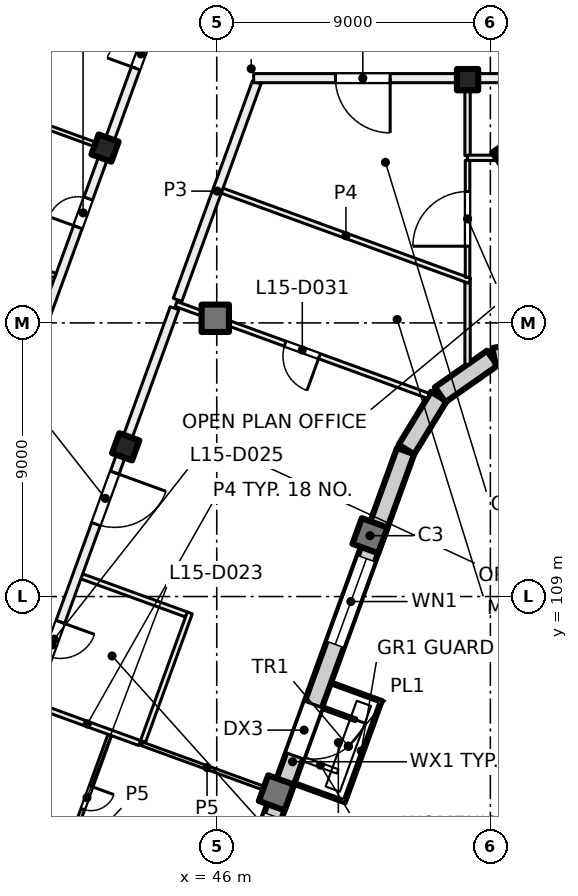
"""IFC4 building model, lengths in metres.
Left out: names, types, materials, properties, quantities, classifications, styles, units other than length and angle.
Written with IfcOpenShell. Run it as: python <this file> out.ifc"""

import sys

from ifc_helpers import new_model, si_unit, direction, frame, frame_2d, origin, origin_2d, place, context, subcontext, project, spatial, rectangle, hollow_rectangle, extrude, element, fill, save


model = new_model("IFC4")
c1 = context("Model", 3, precision=1e-05, world=origin(), true_north=direction((0.0, 1.0)))
c2 = subcontext(c1, "Body", "Model", "MODEL_VIEW")
j1 = project(units=[si_unit("LENGTHUNIT", "METRE"), si_unit("PLANEANGLEUNIT", "RADIAN")], contexts=[c1])
p1 = place(None, origin())
s1 = spatial("IfcSite", under=j1, at=p1, CompositionType="ELEMENT")
p2 = place(p1, origin())
s2 = spatial("IfcBuilding", under=s1, at=p2, CompositionType="ELEMENT")
p3 = place(p2, frame((0.0, 0.0, 67.5)))
s3 = spatial("IfcBuildingStorey", under=s2, at=p3, CompositionType="ELEMENT", Elevation=67.5)
p4 = place(p3, frame((56.036, 123.43, 0.0), z_axis=(0.0, 0.0, 1.0), x_axis=(0.573576436351, -0.819152044289, 0.0)))
e1 = element("IfcColumn", 1, at=p4, inside=s3, PredefinedType="COLUMN", context=c2, shape_type="SweptSolid", body=[
    extrude(hollow_rectangle(XDim=1.4, YDim=1.4, WallThickness=0.04, at=origin_2d()), origin(), (0.0, 0.0, 1.0), 4.0),
])
p5 = place(p3, frame((54.25, 126.0, 0.0), z_axis=(0.0, 0.0, 1.0), x_axis=(1.0, 0.0, 0.0)))
e2 = element("IfcColumn", 2, at=p5, inside=s3, PredefinedType="COLUMN", context=c2, shape_type="SweptSolid", body=[
    extrude(rectangle(XDim=0.7, YDim=0.7, at=origin_2d()), origin(), (0.0, 0.0, 1.0), 4.0),
])
p6 = place(p3, frame((45.952, 118.152, 0.0), z_axis=(0.0, 0.0, 1.0), x_axis=(1.0, 0.0, 0.0)))
e3 = element("IfcColumn", 3, at=p6, inside=s3, PredefinedType="COLUMN", context=c2, shape_type="SweptSolid", body=[
    extrude(rectangle(XDim=0.9, YDim=0.9, at=origin_2d()), origin(), (0.0, 0.0, 1.0), 4.0),
])
for number, where, z_axis, x_axis in (
    (4, (43.006, 113.925, 0.0), (0.0, 0.0, 1.0), (-0.342, -0.94, 0.0)),
    (5, (42.325, 123.751, 0.0), (0.0, 0.0, 1.0), (-0.342, -0.94, 0.0)),
):
    element("IfcColumn", number, at=place(p3, frame(where, z_axis=z_axis, x_axis=x_axis)), inside=s3, PredefinedType="COLUMN", context=c2, shape_type="SweptSolid", body=[
        extrude(rectangle(XDim=0.7, YDim=0.7, at=origin_2d()), origin(), (0.0, 0.0, 1.0), 4.0),
    ])
for number, where, z_axis, x_axis in (
    (6, (51.04, 111.001, 0.0), (0.0, 0.0, 1.0), (-0.342, -0.94, 0.0)),
    (7, (47.962, 102.544, 0.0), (0.0, 0.0, 1.0), (-0.342, -0.94, 0.0)),
):
    element("IfcColumn", number, at=place(p3, frame(where, z_axis=z_axis, x_axis=x_axis)), inside=s3, PredefinedType="COLUMN", context=c2, shape_type="SweptSolid", body=[
        extrude(rectangle(XDim=0.9, YDim=0.9, at=origin_2d()), origin(), (0.0, 0.0, 1.0), 4.0),
    ])
p7 = place(p3, frame((52.212, 113.783, 0.0), z_axis=(0.0, 0.0, 1.0), x_axis=(-0.34202521188, -0.939690775968, 0.0)))
e8 = element("IfcWall", 8, at=p7, inside=s3, PredefinedType="SOLIDWALL", context=c2, shape_type="SweptSolid", body=[
    extrude(rectangle(XDim=21.745, YDim=0.6, at=frame_2d((10.873, 0.0))), origin(), (0.0, 0.0, 1.0), 3.625),
])
p8 = place(p7, frame((3.765, 0.0, 0.9)))
e9 = element("IfcOpeningElement", 9, at=p8, cuts=e8, PredefinedType="OPENING", context=c2, shape_type="SweptSolid", body=[
    extrude(rectangle(XDim=3.0, YDim=2.4, at=frame_2d((1.5, 1.2))), frame((0.0, 0.31, 0.0), z_axis=(0.0, -1.0, 0.0), x_axis=(1.0, 0.0, 0.0)), (0.0, 0.0, 1.0), 0.62),
])
p9 = place(p7, frame((8.865, 0.0, 0.0)))
e10 = element("IfcOpeningElement", 10, at=p9, cuts=e8, PredefinedType="OPENING", context=c2, shape_type="SweptSolid", body=[
    extrude(rectangle(XDim=1.8, YDim=2.4, at=frame_2d((0.9, 1.2))), frame((0.0, 0.31, 0.0), z_axis=(0.0, -1.0, 0.0), x_axis=(1.0, 0.0, 0.0)), (0.0, 0.0, 1.0), 0.62),
])
p10 = place(p7, frame((12.765, 0.0, 0.9)))
e11 = element("IfcOpeningElement", 11, at=p10, cuts=e8, PredefinedType="OPENING", context=c2, shape_type="SweptSolid", body=[
    extrude(rectangle(XDim=3.0, YDim=2.4, at=frame_2d((1.5, 1.2))), frame((0.0, 0.31, 0.0), z_axis=(0.0, -1.0, 0.0), x_axis=(1.0, 0.0, 0.0)), (0.0, 0.0, 1.0), 0.62),
])
p11 = place(p7, frame((17.265, 0.0, 0.9)))
e12 = element("IfcOpeningElement", 12, at=p11, cuts=e8, PredefinedType="OPENING", context=c2, shape_type="SweptSolid", body=[
    extrude(rectangle(XDim=3.0, YDim=2.4, at=frame_2d((1.5, 1.2))), frame((0.0, 0.31, 0.0), z_axis=(0.0, -1.0, 0.0), x_axis=(1.0, 0.0, 0.0)), (0.0, 0.0, 1.0), 0.62),
])
p12 = place(p3, frame((53.305, 115.578, 0.0), z_axis=(0.0, 0.0, 1.0), x_axis=(-0.522402266438, -0.852699168535, 0.0)))
e13 = element("IfcWall", 13, at=p12, inside=s3, PredefinedType="SOLIDWALL", context=c2, shape_type="SweptSolid", body=[
    extrude(rectangle(XDim=2.042, YDim=0.6, at=frame_2d((1.021, 0.0))), origin(), (0.0, 0.0, 1.0), 3.625),
])
for number, where, z_axis, x_axis in (
    (14, (55.062, 116.839, 0.0), (0.0, 0.0, 1.0), (-0.819, -0.574, 0.0)),
    (15, (57.175, 117.294, 0.0), (0.0, 0.0, 1.0), (-0.98, -0.199, 0.0)),
):
    element("IfcWall", number, at=place(p3, frame(where, z_axis=z_axis, x_axis=x_axis)), inside=s3, PredefinedType="SOLIDWALL", context=c2, shape_type="SweptSolid", body=[
        extrude(rectangle(XDim=2.092, YDim=0.6, at=frame_2d((1.046, 0.0))), origin(), (0.0, 0.0, 1.0), 3.625),
    ])
p13 = place(p3, frame((32.881, 97.657, 0.0), z_axis=(0.0, 0.0, 1.0), x_axis=(0.342017360004, 0.939693633828, 0.0)))
e16 = element("IfcWall", 16, at=p13, inside=s3, PredefinedType="PARTITIONING", context=c2, shape_type="SweptSolid", body=[
    extrude(rectangle(XDim=34.516, YDim=0.3, at=frame_2d((17.258, 0.0))), origin(), (0.0, 0.0, 1.0), 3.625),
])
p14 = place(p13, frame((6.225, 0.0, 0.0)))
e17 = element("IfcOpeningElement", 17, at=p14, cuts=e16, PredefinedType="OPENING", context=c2, shape_type="SweptSolid", body=[
    extrude(rectangle(XDim=1.8, YDim=2.1, at=frame_2d((0.9, 1.05))), frame((0.0, 0.16, 0.0), z_axis=(0.0, -1.0, 0.0), x_axis=(1.0, 0.0, 0.0)), (0.0, 0.0, 1.0), 0.32),
])
p15 = place(p13, frame((15.9, 0.0, 0.0)))
e18 = element("IfcOpeningElement", 18, at=p15, cuts=e16, PredefinedType="OPENING", context=c2, shape_type="SweptSolid", body=[
    extrude(rectangle(XDim=1.2, YDim=2.1, at=frame_2d((0.6, 1.05))), frame((0.0, 0.16, 0.0), z_axis=(0.0, -1.0, 0.0), x_axis=(1.0, 0.0, 0.0)), (0.0, 0.0, 1.0), 0.32),
])
p16 = place(p13, frame((20.5, 0.0, 0.0)))
e19 = element("IfcOpeningElement", 19, at=p16, cuts=e16, PredefinedType="OPENING", context=c2, shape_type="SweptSolid", body=[
    extrude(rectangle(XDim=1.0, YDim=2.1, at=frame_2d((0.5, 1.05))), frame((0.0, 0.16, 0.0), z_axis=(0.0, -1.0, 0.0), x_axis=(1.0, 0.0, 0.0)), (0.0, 0.0, 1.0), 0.32),
])
p17 = place(p13, frame((25.0, 0.0, 0.0)))
e20 = element("IfcOpeningElement", 20, at=p17, cuts=e16, PredefinedType="OPENING", context=c2, shape_type="SweptSolid", body=[
    extrude(rectangle(XDim=1.0, YDim=2.1, at=frame_2d((0.5, 1.05))), frame((0.0, 0.16, 0.0), z_axis=(0.0, -1.0, 0.0), x_axis=(1.0, 0.0, 0.0)), (0.0, 0.0, 1.0), 0.32),
])
p18 = place(p13, frame((30.562, 0.0, 0.0)))
e21 = element("IfcOpeningElement", 21, at=p18, cuts=e16, PredefinedType="OPENING", context=c2, shape_type="SweptSolid", body=[
    extrude(rectangle(XDim=1.0, YDim=2.1, at=frame_2d((0.5, 1.05))), frame((0.0, 0.16, 0.0), z_axis=(0.0, -1.0, 0.0), x_axis=(1.0, 0.0, 0.0)), (0.0, 0.0, 1.0), 0.32),
])
p19 = place(p3, frame((32.892, 122.395, 0.0), z_axis=(0.0, 0.0, 1.0), x_axis=(0.939684311623, -0.3420429717, 0.0)))
e22 = element("IfcWall", 22, at=p19, inside=s3, PredefinedType="PARTITIONING", context=c2, shape_type="SweptSolid", body=[
    extrude(rectangle(XDim=8.301, YDim=0.15, at=frame_2d((4.15, 0.0))), origin(), (0.0, 0.0, 1.0), 3.625),
])
p20 = place(p3, frame((42.482, 104.446, 0.0), z_axis=(0.0, 0.0, 1.0), x_axis=(-0.342025030348, -0.939690842041, 0.0)))
e23 = element("IfcWall", 23, at=p20, inside=s3, PredefinedType="PARTITIONING", context=c2, shape_type="SweptSolid", body=[
    extrude(rectangle(XDim=9.663, YDim=0.125, at=frame_2d((4.832, 0.0))), origin(), (0.0, 0.0, 1.0), 3.625),
])
p21 = place(p20, frame((1.797, 0.0, 0.0)))
e24 = element("IfcOpeningElement", 24, at=p21, cuts=e23, PredefinedType="OPENING", context=c2, shape_type="SweptSolid", body=[
    extrude(rectangle(XDim=0.8, YDim=2.1, at=frame_2d((0.4, 1.05))), frame((0.0, 0.073, 0.0), z_axis=(0.0, -1.0, 0.0), x_axis=(1.0, 0.0, 0.0)), (0.0, 0.0, 1.0), 0.145),
])
p22 = place(p20, frame((5.015, 0.0, 0.0)))
e25 = element("IfcOpeningElement", 25, at=p22, cuts=e23, PredefinedType="OPENING", context=c2, shape_type="SweptSolid", body=[
    extrude(rectangle(XDim=0.8, YDim=2.1, at=frame_2d((0.4, 1.05))), frame((0.0, 0.073, 0.0), z_axis=(0.0, -1.0, 0.0), x_axis=(1.0, 0.0, 0.0)), (0.0, 0.0, 1.0), 0.145),
])
p23 = place(p3, frame((40.021, 105.434, 0.0), z_axis=(0.0, 0.0, 1.0), x_axis=(0.939740864669, -0.341887565249, 0.0)))
e26 = element("IfcWall", 26, at=p23, inside=s3, PredefinedType="PARTITIONING", context=c2, shape_type="SweptSolid", body=[
    extrude(rectangle(XDim=3.663, YDim=0.175, at=frame_2d((1.831, 0.0))), origin(), (0.0, 0.0, 1.0), 3.625),
])
p24 = place(p3, frame((41.561, 109.663, 0.0), z_axis=(0.0, 0.0, 1.0), x_axis=(0.939623960717, -0.342208726434, 0.0)))
e27 = element("IfcWall", 27, at=p24, inside=s3, PredefinedType="PARTITIONING", context=c2, shape_type="SweptSolid", body=[
    extrude(rectangle(XDim=3.662, YDim=0.175, at=frame_2d((1.831, 0.0))), origin(), (0.0, 0.0, 1.0), 3.625),
])
p25 = place(p3, frame((42.231, 123.785, 0.0), z_axis=(0.0, 0.0, 1.0), x_axis=(-0.939687752599, 0.342033518263, 0.0)))
e28 = element("IfcWall", 28, at=p25, inside=s3, PredefinedType="PARTITIONING", context=c2, shape_type="SweptSolid", body=[
    extrude(rectangle(XDim=8.301, YDim=0.15, at=frame_2d((4.15, 0.0))), origin(), (0.0, 0.0, 1.0), 3.625),
])
p26 = place(p3, frame((43.542, 104.153, 0.0), z_axis=(0.0, 0.0, 1.0), x_axis=(0.939646198652, -0.34214766017, 0.0)))
e29 = element("IfcWall", 29, at=p26, inside=s3, PredefinedType="PARTITIONING", context=c2, shape_type="SweptSolid", body=[
    extrude(rectangle(XDim=4.554, YDim=0.125, at=frame_2d((2.277, 0.0))), origin(), (0.0, 0.0, 1.0), 3.625),
])
p27 = place(p3, frame((52.965, 115.598, 0.0), z_axis=(0.0, 0.0, 1.0), x_axis=(-0.939650555598, 0.342135694374, 0.0)))
e30 = element("IfcWall", 30, at=p27, inside=s3, PredefinedType="PARTITIONING", context=c2, shape_type="SweptSolid", body=[
    extrude(rectangle(XDim=8.836, YDim=0.175, at=frame_2d((4.418, 0.0))), origin(), (0.0, 0.0, 1.0), 3.625),
])
p28 = place(p27, frame((3.818, 0.0, 0.0)))
e31 = element("IfcOpeningElement", 31, at=p28, cuts=e30, PredefinedType="OPENING", context=c2, shape_type="SweptSolid", body=[
    extrude(rectangle(XDim=1.2, YDim=2.1, at=frame_2d((0.6, 1.05))), frame((0.0, 0.097, 0.0), z_axis=(0.0, -1.0, 0.0), x_axis=(1.0, 0.0, 0.0)), (0.0, 0.0, 1.0), 0.195),
])
p29 = place(p3, frame((44.612, 118.483, 0.0), z_axis=(0.0, 0.0, 1.0), x_axis=(-0.342043123066, -0.939684256526, 0.0)))
e32 = element("IfcWall", 32, at=p29, inside=s3, PredefinedType="PARTITIONING", context=c2, shape_type="SweptSolid", body=[
    extrude(rectangle(XDim=23.582, YDim=0.3, at=frame_2d((11.791, 0.0))), origin(), (0.0, 0.0, 1.0), 3.625),
])
p30 = place(p29, frame((16.583, 0.0, 0.0)))
e33 = element("IfcOpeningElement", 33, at=p30, cuts=e32, PredefinedType="OPENING", context=c2, shape_type="SweptSolid", body=[
    extrude(rectangle(XDim=1.0, YDim=2.1, at=frame_2d((0.5, 1.05))), frame((0.0, 0.16, 0.0), z_axis=(0.0, -1.0, 0.0), x_axis=(1.0, 0.0, 0.0)), (0.0, 0.0, 1.0), 0.32),
])
p31 = place(p29, frame((10.982, 0.0, 0.0)))
e34 = element("IfcOpeningElement", 34, at=p31, cuts=e32, PredefinedType="OPENING", context=c2, shape_type="SweptSolid", body=[
    extrude(rectangle(XDim=1.2, YDim=2.1, at=frame_2d((0.6, 1.05))), frame((0.0, 0.16, 0.0), z_axis=(0.0, -1.0, 0.0), x_axis=(1.0, 0.0, 0.0)), (0.0, 0.0, 1.0), 0.32),
])
p32 = place(p29, frame((5.756, 0.0, 0.0)))
e35 = element("IfcOpeningElement", 35, at=p32, cuts=e32, PredefinedType="OPENING", context=c2, shape_type="SweptSolid", body=[
    extrude(rectangle(XDim=1.8, YDim=2.1, at=frame_2d((0.9, 1.05))), frame((0.0, 0.16, 0.0), z_axis=(0.0, -1.0, 0.0), x_axis=(1.0, 0.0, 0.0)), (0.0, 0.0, 1.0), 0.32),
])
p33 = place(p3, frame((45.114, 108.462, 0.0), z_axis=(0.0, 0.0, 1.0), x_axis=(-0.342056723843, -0.93967930576, 0.0)))
e36 = element("IfcWall", 36, at=p33, inside=s3, PredefinedType="PARTITIONING", context=c2, shape_type="SweptSolid", body=[
    extrude(rectangle(XDim=4.5, YDim=0.175, at=frame_2d((2.25, 0.0))), origin(), (0.0, 0.0, 1.0), 3.625),
])
p34 = place(p3, frame((47.314, 125.909, 0.0), z_axis=(0.0, 0.0, 1.0), x_axis=(-0.34198522802, -0.939705328183, 0.0)))
e37 = element("IfcWall", 37, at=p34, inside=s3, PredefinedType="PARTITIONING", context=c2, shape_type="SweptSolid", body=[
    extrude(rectangle(XDim=7.609, YDim=0.3, at=frame_2d((3.804, 0.0))), origin(), (0.0, 0.0, 1.0), 3.625),
])
p35 = place(p3, frame((54.25, 116.637, 0.0), z_axis=(0.0, 0.0, 1.0), x_axis=(0.0, 1.0, 0.0)))
e38 = element("IfcWall", 38, at=p35, inside=s3, PredefinedType="PARTITIONING", context=c2, shape_type="SweptSolid", body=[
    extrude(rectangle(XDim=2.776, YDim=0.175, at=frame_2d((1.388, 0.0))), origin(), (0.0, 0.0, 1.0), 3.625),
])
p36 = place(p3, frame((54.32, 119.384, 0.0), z_axis=(0.0, 0.0, 1.0), x_axis=(-0.939632908118, 0.342184157994, 0.0)))
e39 = element("IfcWall", 39, at=p36, inside=s3, PredefinedType="PARTITIONING", context=c2, shape_type="SweptSolid", body=[
    extrude(rectangle(XDim=8.665, YDim=0.175, at=frame_2d((4.333, 0.0))), origin(), (0.0, 0.0, 1.0), 3.625),
])
p37 = place(p3, frame((54.25, 123.502, 0.0), z_axis=(0.0, 0.0, 1.0), x_axis=(0.0, 1.0, 0.0)))
e40 = element("IfcWall", 40, at=p37, inside=s3, PredefinedType="PARTITIONING", context=c2, shape_type="SweptSolid", body=[
    extrude(rectangle(XDim=2.398, YDim=0.175, at=frame_2d((1.199, 0.0))), origin(), (0.0, 0.0, 1.0), 3.625),
])
p38 = place(p3, frame((54.25, 123.43, 0.0), z_axis=(0.0, 0.0, 1.0), x_axis=(1.0, 0.0, 0.0)))
e41 = element("IfcWall", 41, at=p38, inside=s3, PredefinedType="PARTITIONING", context=c2, shape_type="SweptSolid", body=[
    extrude(rectangle(XDim=8.912, YDim=0.175, at=frame_2d((4.456, 0.0))), origin(), (0.0, 0.0, 1.0), 3.625),
])
p39 = place(p38, frame((3.866, 0.0, 0.0)))
e42 = element("IfcOpeningElement", 42, at=p39, cuts=e41, PredefinedType="OPENING", context=c2, shape_type="SweptSolid", body=[
    extrude(rectangle(XDim=1.2, YDim=2.1, at=frame_2d((0.6, 1.05))), frame((0.0, 0.097, 0.0), z_axis=(0.0, -1.0, 0.0), x_axis=(1.0, 0.0, 0.0)), (0.0, 0.0, 1.0), 0.195),
])
p40 = place(p3, frame((54.25, 119.498, 0.0), z_axis=(0.0, 0.0, 1.0), x_axis=(0.0, 1.0, 0.0)))
e43 = element("IfcWall", 43, at=p40, inside=s3, PredefinedType="PARTITIONING", context=c2, shape_type="SweptSolid", body=[
    extrude(rectangle(XDim=3.848, YDim=0.15, at=frame_2d((1.924, 0.0))), origin(), (0.0, 0.0, 1.0), 3.625),
])
p41 = place(p40, frame((1.024, 0.0, 0.0)))
e44 = element("IfcOpeningElement", 44, at=p41, cuts=e43, PredefinedType="OPENING", context=c2, shape_type="SweptSolid", body=[
    extrude(rectangle(XDim=1.8, YDim=2.1, at=frame_2d((0.9, 1.05))), frame((0.0, 0.085, 0.0), z_axis=(0.0, -1.0, 0.0), x_axis=(1.0, 0.0, 0.0)), (0.0, 0.0, 1.0), 0.17),
])
p42 = place(p3, frame((91.0, 126.05, 0.0), z_axis=(0.0, 0.0, 1.0), x_axis=(-1.0, 0.0, 0.0)))
e45 = element("IfcWall", 45, at=p42, inside=s3, PredefinedType="PARTITIONING", context=c2, shape_type="SweptSolid", body=[
    extrude(rectangle(XDim=43.785, YDim=0.3, at=frame_2d((21.893, 0.0))), origin(), (0.0, 0.0, 1.0), 3.625),
])
p43 = place(p42, frame((2.125, 0.0, 0.0)))
e46 = element("IfcOpeningElement", 46, at=p43, cuts=e45, PredefinedType="OPENING", context=c2, shape_type="SweptSolid", body=[
    extrude(rectangle(XDim=1.0, YDim=2.1, at=frame_2d((0.5, 1.05))), frame((0.0, 0.16, 0.0), z_axis=(0.0, -1.0, 0.0), x_axis=(1.0, 0.0, 0.0)), (0.0, 0.0, 1.0), 0.32),
])
p44 = place(p42, frame((7.0, 0.0, 0.0)))
e47 = element("IfcOpeningElement", 47, at=p44, cuts=e45, PredefinedType="OPENING", context=c2, shape_type="SweptSolid", body=[
    extrude(rectangle(XDim=1.0, YDim=2.1, at=frame_2d((0.5, 1.05))), frame((0.0, 0.16, 0.0), z_axis=(0.0, -1.0, 0.0), x_axis=(1.0, 0.0, 0.0)), (0.0, 0.0, 1.0), 0.32),
])
p45 = place(p42, frame((11.5, 0.0, 0.0)))
e48 = element("IfcOpeningElement", 48, at=p45, cuts=e45, PredefinedType="OPENING", context=c2, shape_type="SweptSolid", body=[
    extrude(rectangle(XDim=1.0, YDim=2.1, at=frame_2d((0.5, 1.05))), frame((0.0, 0.16, 0.0), z_axis=(0.0, -1.0, 0.0), x_axis=(1.0, 0.0, 0.0)), (0.0, 0.0, 1.0), 0.32),
])
p46 = place(p42, frame((21.35, 0.0, 0.0)))
e49 = element("IfcOpeningElement", 49, at=p46, cuts=e45, PredefinedType="OPENING", context=c2, shape_type="SweptSolid", body=[
    extrude(rectangle(XDim=0.8, YDim=2.1, at=frame_2d((0.4, 1.05))), frame((0.0, 0.16, 0.0), z_axis=(0.0, -1.0, 0.0), x_axis=(1.0, 0.0, 0.0)), (0.0, 0.0, 1.0), 0.32),
])
p47 = place(p42, frame((16.75, 0.0, 0.0)))
e50 = element("IfcOpeningElement", 50, at=p47, cuts=e45, PredefinedType="OPENING", context=c2, shape_type="SweptSolid", body=[
    extrude(rectangle(XDim=1.0, YDim=2.1, at=frame_2d((0.5, 1.05))), frame((0.0, 0.16, 0.0), z_axis=(0.0, -1.0, 0.0), x_axis=(1.0, 0.0, 0.0)), (0.0, 0.0, 1.0), 0.32),
])
p48 = place(p42, frame((25.0, 0.0, 0.0)))
e51 = element("IfcOpeningElement", 51, at=p48, cuts=e45, PredefinedType="OPENING", context=c2, shape_type="SweptSolid", body=[
    extrude(rectangle(XDim=1.0, YDim=2.1, at=frame_2d((0.5, 1.05))), frame((0.0, 0.16, 0.0), z_axis=(0.0, -1.0, 0.0), x_axis=(1.0, 0.0, 0.0)), (0.0, 0.0, 1.0), 0.32),
])
p49 = place(p42, frame((39.296, 0.0, 0.0)))
e52 = element("IfcOpeningElement", 52, at=p49, cuts=e45, PredefinedType="OPENING", context=c2, shape_type="SweptSolid", body=[
    extrude(rectangle(XDim=1.8, YDim=2.1, at=frame_2d((0.9, 1.05))), frame((0.0, 0.16, 0.0), z_axis=(0.0, -1.0, 0.0), x_axis=(1.0, 0.0, 0.0)), (0.0, 0.0, 1.0), 0.32),
])
p50 = place(p8, origin())
e53 = element("IfcWindow", 53, at=p50, inside=s3, PartitioningType="SINGLE_PANEL", PredefinedType="WINDOW", context=c2, shape_type="SweptSolid", body=[
    extrude(rectangle(XDim=3.0, YDim=2.4, at=frame_2d((1.5, 1.2))), frame((0.0, 0.03, 0.0), z_axis=(0.0, -1.0, 0.0), x_axis=(1.0, 0.0, 0.0)), (0.0, 0.0, 1.0), 0.06),
])
fill(e9, e53)
p51 = place(p9, origin())
e54 = element("IfcDoor", 54, at=p51, inside=s3, OperationType="DOUBLE_DOOR_SINGLE_SWING", PredefinedType="DOOR", context=c2, shape_type="SweptSolid", body=[
    extrude(rectangle(XDim=1.8, YDim=2.4, at=frame_2d((0.9, 1.2))), frame((0.0, 0.025, 0.0), z_axis=(0.0, -1.0, 0.0), x_axis=(1.0, 0.0, 0.0)), (0.0, 0.0, 1.0), 0.05),
])
fill(e10, e54)
p52 = place(p10, origin())
e55 = element("IfcWindow", 55, at=p52, inside=s3, PartitioningType="SINGLE_PANEL", PredefinedType="WINDOW", context=c2, shape_type="SweptSolid", body=[
    extrude(rectangle(XDim=3.0, YDim=2.4, at=frame_2d((1.5, 1.2))), frame((0.0, 0.03, 0.0), z_axis=(0.0, -1.0, 0.0), x_axis=(1.0, 0.0, 0.0)), (0.0, 0.0, 1.0), 0.06),
])
fill(e11, e55)
p53 = place(p41, origin())
e56 = element("IfcDoor", 56, at=p53, inside=s3, OperationType="DOUBLE_DOOR_SINGLE_SWING", PredefinedType="DOOR", context=c2, shape_type="SweptSolid", body=[
    extrude(rectangle(XDim=1.8, YDim=2.1, at=frame_2d((0.9, 1.05))), frame((0.0, 0.025, 0.0), z_axis=(0.0, -1.0, 0.0), x_axis=(1.0, 0.0, 0.0)), (0.0, 0.0, 1.0), 0.05),
])
fill(e44, e56)
p54 = place(p17, origin())
e57 = element("IfcDoor", 57, at=p54, inside=s3, OperationType="SINGLE_SWING_RIGHT", PredefinedType="DOOR", context=c2, shape_type="SweptSolid", body=[
    extrude(rectangle(XDim=1.0, YDim=2.1, at=frame_2d((0.5, 1.05))), frame((0.0, 0.025, 0.0), z_axis=(0.0, -1.0, 0.0), x_axis=(1.0, 0.0, 0.0)), (0.0, 0.0, 1.0), 0.05),
])
fill(e20, e57)
p55 = place(p21, origin())
e58 = element("IfcDoor", 58, at=p55, inside=s3, OperationType="SINGLE_SWING_RIGHT", PredefinedType="DOOR", context=c2, shape_type="SweptSolid", body=[
    extrude(rectangle(XDim=0.8, YDim=2.1, at=frame_2d((0.4, 1.05))), frame((0.0, 0.025, 0.0), z_axis=(0.0, -1.0, 0.0), x_axis=(1.0, 0.0, 0.0)), (0.0, 0.0, 1.0), 0.05),
])
fill(e24, e58)
p56 = place(p31, origin())
e59 = element("IfcDoor", 59, at=p56, inside=s3, OperationType="DOUBLE_DOOR_SINGLE_SWING", PredefinedType="DOOR", context=c2, shape_type="SweptSolid", body=[
    extrude(rectangle(XDim=1.2, YDim=2.1, at=frame_2d((0.6, 1.05))), frame((0.0, 0.025, 0.0), z_axis=(0.0, -1.0, 0.0), x_axis=(1.0, 0.0, 0.0)), (0.0, 0.0, 1.0), 0.05),
])
fill(e34, e59)
p57 = place(p32, origin())
e60 = element("IfcDoor", 60, at=p57, inside=s3, OperationType="DOUBLE_DOOR_SINGLE_SWING", PredefinedType="DOOR", context=c2, shape_type="SweptSolid", body=[
    extrude(rectangle(XDim=1.8, YDim=2.1, at=frame_2d((0.9, 1.05))), frame((0.0, 0.025, 0.0), z_axis=(0.0, -1.0, 0.0), x_axis=(1.0, 0.0, 0.0)), (0.0, 0.0, 1.0), 0.05),
])
fill(e35, e60)
p58 = place(p18, origin())
e61 = element("IfcDoor", 61, at=p58, inside=s3, OperationType="SINGLE_SWING_LEFT", PredefinedType="DOOR", context=c2, shape_type="SweptSolid", body=[
    extrude(rectangle(XDim=1.0, YDim=2.1, at=frame_2d((0.5, 1.05))), frame((0.0, 0.025, 0.0), z_axis=(0.0, -1.0, 0.0), x_axis=(1.0, 0.0, 0.0)), (0.0, 0.0, 1.0), 0.05),
])
fill(e21, e61)
p59 = place(p49, origin())
e62 = element("IfcDoor", 62, at=p59, inside=s3, OperationType="DOUBLE_DOOR_SINGLE_SWING", PredefinedType="DOOR", context=c2, shape_type="SweptSolid", body=[
    extrude(rectangle(XDim=1.8, YDim=2.1, at=frame_2d((0.9, 1.05))), frame((0.0, 0.025, 0.0), z_axis=(0.0, -1.0, 0.0), x_axis=(1.0, 0.0, 0.0)), (0.0, 0.0, 1.0), 0.05),
])
fill(e52, e62)
p60 = place(p28, origin())
e63 = element("IfcDoor", 63, at=p60, inside=s3, OperationType="DOUBLE_DOOR_SINGLE_SWING", PredefinedType="DOOR", context=c2, shape_type="SweptSolid", body=[
    extrude(rectangle(XDim=1.2, YDim=2.1, at=frame_2d((0.6, 1.05))), frame((0.0, 0.025, 0.0), z_axis=(0.0, -1.0, 0.0), x_axis=(1.0, 0.0, 0.0)), (0.0, 0.0, 1.0), 0.05),
])
fill(e31, e63)
save(model, sys.argv[1])
